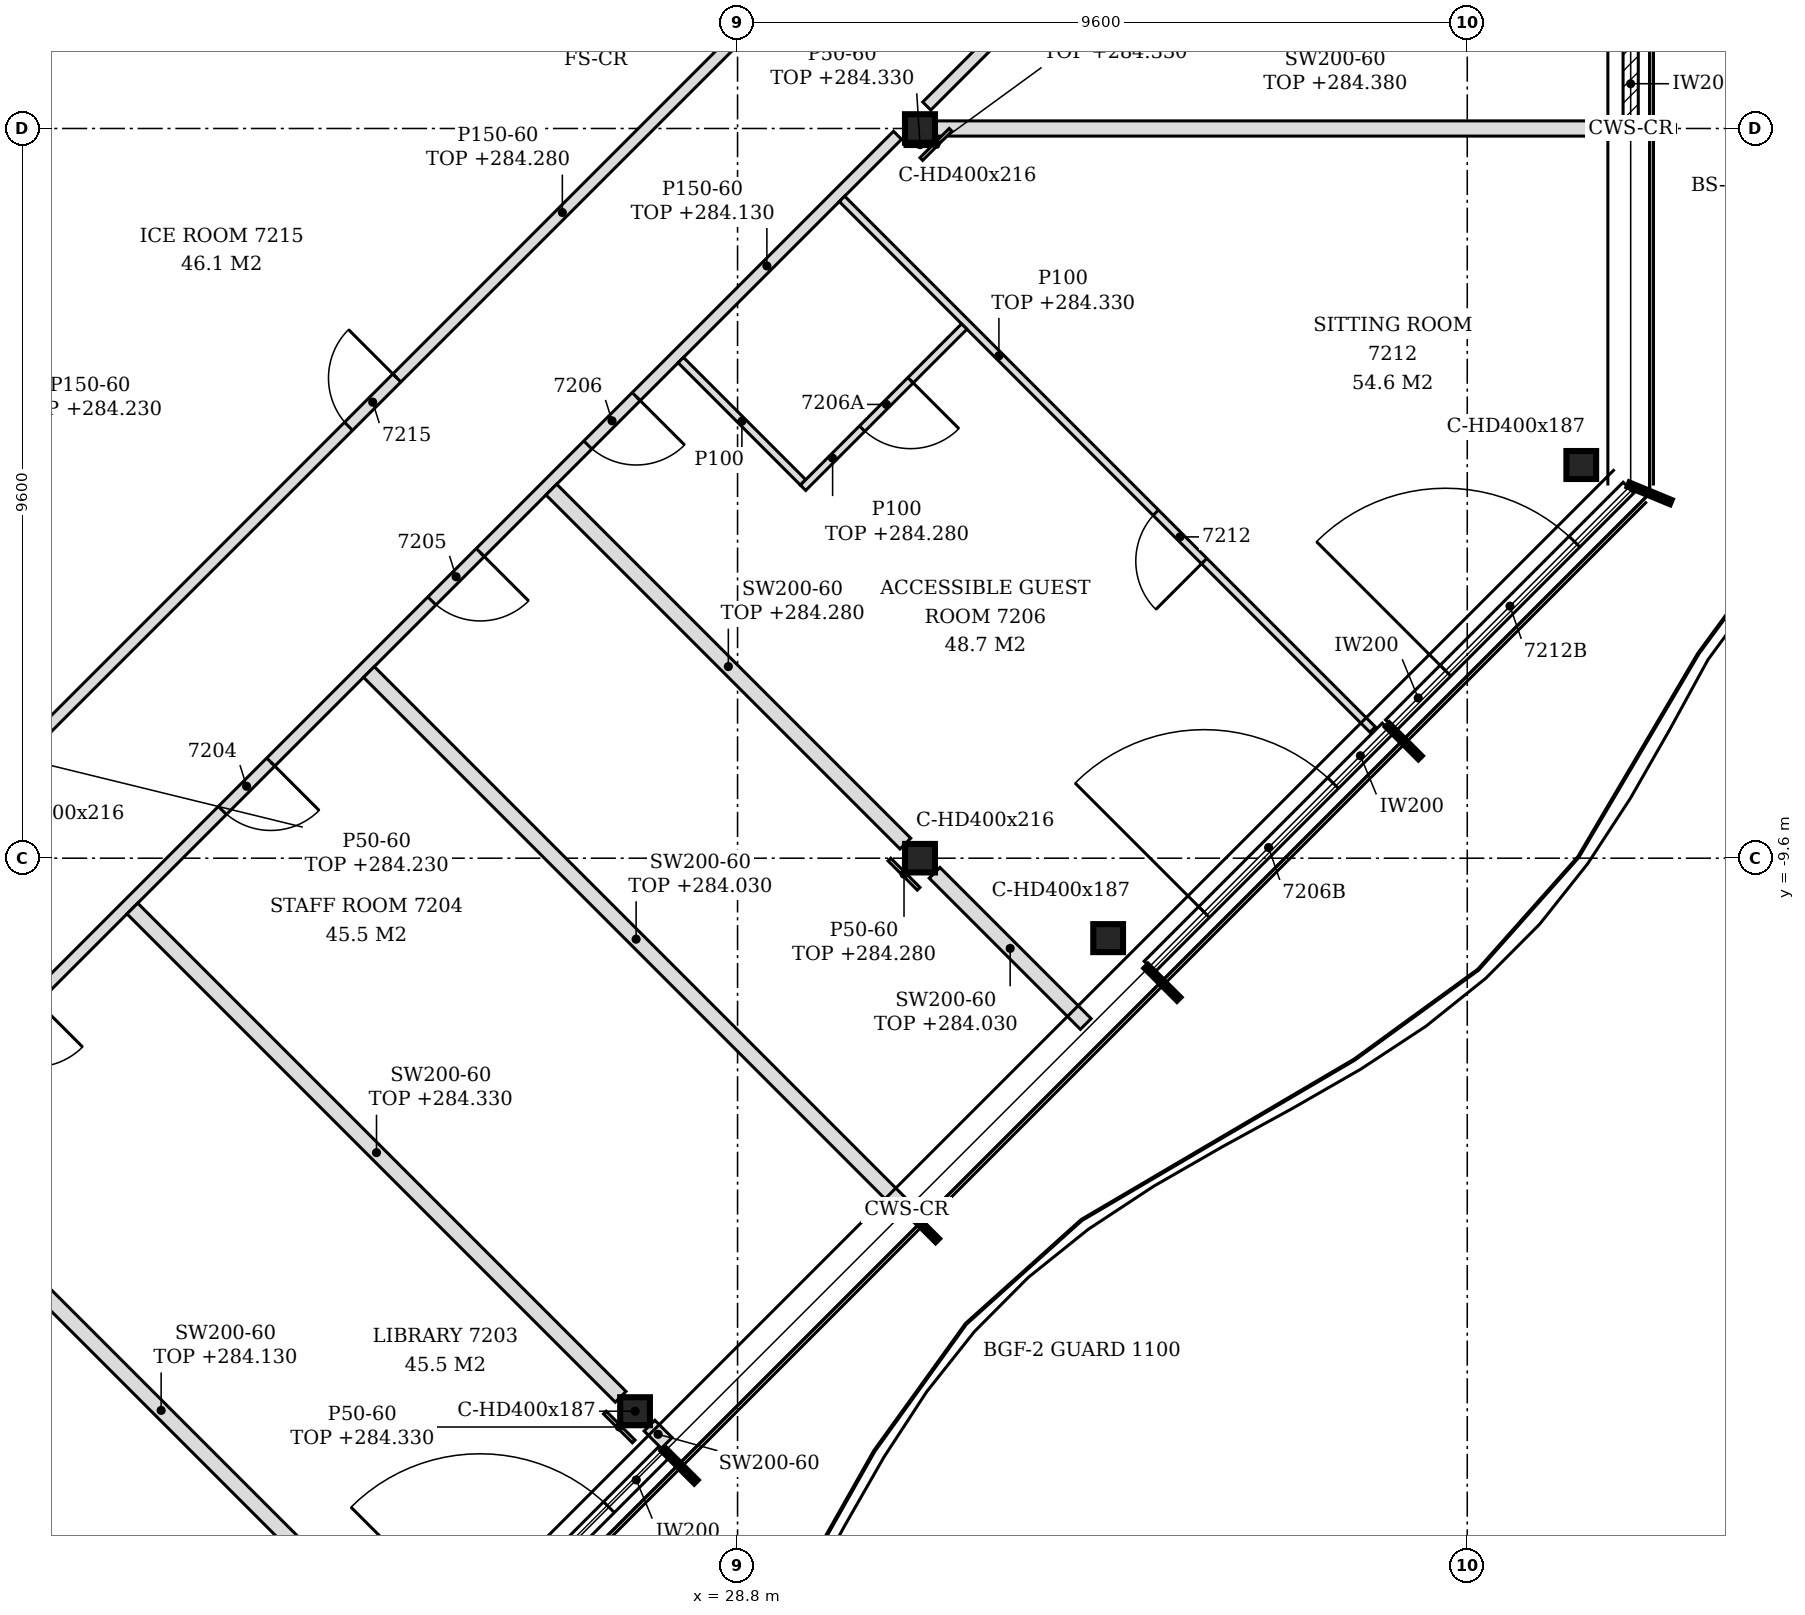
"""IFC4 building model, lengths in metres.
Left out: names, types, materials, properties, quantities, classifications, styles, units other than length and angle.
Written with IfcOpenShell. Run it as: python <this file> out.ifc"""

import sys

from ifc_helpers import new_model, si_unit, direction, frame, frame_2d, origin, origin_2d, place, context, subcontext, project, spatial, polyline, rectangle, i_section, outline, extrude, element, fill, save


model = new_model("IFC4")
c1 = context("Model", 3, precision=1e-05, world=origin(), true_north=direction((0.0, 1.0)))
c2 = subcontext(c1, "Body", "Model", "MODEL_VIEW")
j1 = project(units=[si_unit("LENGTHUNIT", "METRE"), si_unit("PLANEANGLEUNIT", "RADIAN")], contexts=[c1])
p1 = place(None, origin())
s1 = spatial("IfcSite", under=j1, at=p1, CompositionType="ELEMENT")
p2 = place(p1, origin())
s2 = spatial("IfcBuilding", under=s1, at=p2, CompositionType="ELEMENT")
p3 = place(p2, frame((0.0, 0.0, 281.4)))
s3 = spatial("IfcBuildingStorey", under=s2, at=p3, CompositionType="ELEMENT", Elevation=281.4)
for number, where, z_axis, x_axis in (
    (1, (27.451, -16.876, -0.15), (0.0, 0.0, 1.0), (1.0, 0.0, 0.0)),
    (2, (33.676, -10.652, -0.15), (0.0, 0.0, 1.0), (1.0, 0.0, 0.0)),
    (3, (39.9, -4.427, -0.15), (0.0, 0.0, 1.0), (1.0, 0.0, 0.0)),
):
    element("IfcColumn", number, at=place(p3, frame(where, z_axis=z_axis, x_axis=x_axis)), inside=s3, PredefinedType="COLUMN", context=c2, shape_type="SweptSolid", body=[
        extrude(i_section(OverallWidth=0.391, OverallDepth=0.368, WebThickness=0.015, FlangeThickness=0.024, FilletRadius=0.015, at=origin_2d()), origin(), (0.0, 0.0, 1.0), 3.6),
    ])
for number, where, z_axis, x_axis in (
    (4, (31.2, -9.6, -0.15), (0.0, 0.0, 1.0), (1.0, 0.0, 0.0)),
    (5, (31.2, 0.0, -0.15), (0.0, 0.0, 1.0), (1.0, 0.0, 0.0)),
):
    element("IfcColumn", number, at=place(p3, frame(where, z_axis=z_axis, x_axis=x_axis)), inside=s3, PredefinedType="COLUMN", context=c2, shape_type="SweptSolid", body=[
        extrude(i_section(OverallWidth=0.394, OverallDepth=0.375, WebThickness=0.017, FlangeThickness=0.028, FilletRadius=0.015, at=origin_2d()), origin(), (0.0, 0.0, 1.0), 3.6),
    ])
p4 = place(p3, frame((24.693, -20.553, 0.0), z_axis=(0.0, 0.0, 1.0), x_axis=(0.707079231393, 0.707134329907, 0.0)))
e6 = element("IfcWall", 6, at=p4, inside=s3, PredefinedType="NOTDEFINED", context=c2, shape_type="SweptSolid", body=[
    extrude(rectangle(XDim=4.431, YDim=0.2, at=frame_2d((2.215, 0.0))), origin(), (0.0, 0.0, 1.0), 3.45),
])
p5 = place(p4, frame((1.015, 0.0, 0.0)))
e7 = element("IfcOpeningElement", 7, at=p5, cuts=e6, PredefinedType="OPENING", context=c2, shape_type="SweptSolid", body=[
    extrude(rectangle(XDim=2.4, YDim=2.4, at=frame_2d((1.2, 1.2))), frame((0.0, 0.11, 0.0), z_axis=(0.0, -1.0, 0.0), x_axis=(1.0, 0.0, 0.0)), (0.0, 0.0, 1.0), 0.22),
])
p6 = place(p3, frame((34.22, -11.026, 0.0), z_axis=(0.0, 0.0, 1.0), x_axis=(0.707134329907, 0.707079231393, 0.0)))
e8 = element("IfcWall", 8, at=p6, inside=s3, PredefinedType="NOTDEFINED", context=c2, shape_type="SweptSolid", body=[
    extrude(rectangle(XDim=4.431, YDim=0.2, at=frame_2d((2.215, 0.0))), origin(), (0.0, 0.0, 1.0), 3.45),
])
p7 = place(p6, frame((1.015, 0.0, 0.0)))
e9 = element("IfcOpeningElement", 9, at=p7, cuts=e8, PredefinedType="OPENING", context=c2, shape_type="SweptSolid", body=[
    extrude(rectangle(XDim=2.4, YDim=2.4, at=frame_2d((1.2, 1.2))), frame((0.0, 0.11, 0.0), z_axis=(0.0, -1.0, 0.0), x_axis=(1.0, 0.0, 0.0)), (0.0, 0.0, 1.0), 0.22),
])
p8 = place(p3, frame((37.396, -7.851, 0.0), z_axis=(0.0, 0.0, 1.0), x_axis=(0.707106781187, 0.707106781187, 0.0)))
e10 = element("IfcWall", 10, at=p8, inside=s3, PredefinedType="NOTDEFINED", context=c2, shape_type="SweptSolid", body=[
    extrude(rectangle(XDim=4.421, YDim=0.2, at=frame_2d((2.21, 0.0))), origin(), (0.0, 0.0, 1.0), 3.45),
])
p9 = place(p8, frame((1.016, 0.0, 0.0)))
e11 = element("IfcOpeningElement", 11, at=p9, cuts=e10, PredefinedType="OPENING", context=c2, shape_type="SweptSolid", body=[
    extrude(rectangle(XDim=2.4, YDim=2.4, at=frame_2d((1.2, 1.2))), frame((0.0, 0.11, 0.0), z_axis=(0.0, -1.0, 0.0), x_axis=(1.0, 0.0, 0.0)), (0.0, 0.0, 1.0), 0.22),
])
p10 = place(p3, frame((40.55, 0.03, 0.0), z_axis=(0.0, 0.0, 1.0), x_axis=(0.0, 1.0, 0.0)))
e12 = element("IfcWall", 12, at=p10, inside=s3, PredefinedType="NOTDEFINED", context=c2, shape_type="SweptSolid", body=[
    extrude(rectangle(XDim=4.626, YDim=0.2, at=frame_2d((2.313, 0.0))), origin(), (0.0, 0.0, 1.0), 3.45),
])
p11 = place(p10, frame((1.118, 0.0, 0.0)))
e13 = element("IfcOpeningElement", 13, at=p11, cuts=e12, PredefinedType="OPENING", context=c2, shape_type="SweptSolid", body=[
    extrude(rectangle(XDim=2.4, YDim=2.4, at=frame_2d((1.2, 1.2))), frame((0.0, 0.11, 0.0), z_axis=(0.0, -1.0, 0.0), x_axis=(1.0, 0.0, 0.0)), (0.0, 0.0, 1.0), 0.22),
])
p12 = place(p3, frame((24.707, -20.355, 0.0), z_axis=(0.0, 0.0, 1.0), x_axis=(-0.707106781187, 0.707106781187, 0.0)))
e14 = element("IfcWall", 14, at=p12, inside=s3, PredefinedType="PARTITIONING", context=c2, shape_type="SweptSolid", body=[
    extrude(rectangle(XDim=9.873, YDim=0.2, at=frame_2d((4.937, 0.0))), origin(), (0.0, 0.0, 1.0), 2.73),
])
p13 = place(p3, frame((27.869, -17.293, 0.0), z_axis=(0.0, 0.0, 1.0), x_axis=(-0.707106781187, 0.707106781187, 0.0)))
e15 = element("IfcWall", 15, at=p13, inside=s3, PredefinedType="PARTITIONING", context=c2, shape_type="SweptSolid", body=[
    extrude(rectangle(XDim=0.322, YDim=0.2, at=frame_2d((0.161, 0.0))), origin(), (0.0, 0.0, 1.0), 3.45),
])
p14 = place(p3, frame((14.322, -16.672, 0.0), z_axis=(0.0, 0.0, 1.0), x_axis=(0.707106781187, 0.707106781187, 0.0)))
e16 = element("IfcWall", 16, at=p14, inside=s3, PredefinedType="PARTITIONING", context=c2, shape_type="SweptSolid", body=[
    extrude(rectangle(XDim=23.452, YDim=0.15, at=frame_2d((11.726, 0.0))), origin(), (0.0, 0.0, 1.0), 2.73),
])
p15 = place(p14, frame((0.775, 0.0, 0.0)))
e17 = element("IfcOpeningElement", 17, at=p15, cuts=e16, PredefinedType="OPENING", context=c2, shape_type="SweptSolid", body=[
    extrude(rectangle(XDim=0.9, YDim=2.1, at=frame_2d((0.45, 1.05))), frame((0.0, 0.085, 0.0), z_axis=(0.0, -1.0, 0.0), x_axis=(1.0, 0.0, 0.0)), (0.0, 0.0, 1.0), 0.17),
])
p16 = place(p14, frame((6.489, 0.0, 0.0)))
e18 = element("IfcOpeningElement", 18, at=p16, cuts=e16, PredefinedType="OPENING", context=c2, shape_type="SweptSolid", body=[
    extrude(rectangle(XDim=0.9, YDim=2.1, at=frame_2d((0.45, 1.05))), frame((0.0, 0.085, 0.0), z_axis=(0.0, -1.0, 0.0), x_axis=(1.0, 0.0, 0.0)), (0.0, 0.0, 1.0), 0.17),
])
p17 = place(p14, frame((10.89, 0.0, 0.0)))
e19 = element("IfcOpeningElement", 19, at=p17, cuts=e16, PredefinedType="OPENING", context=c2, shape_type="SweptSolid", body=[
    extrude(rectangle(XDim=0.9, YDim=2.1, at=frame_2d((0.45, 1.05))), frame((0.0, 0.085, 0.0), z_axis=(0.0, -1.0, 0.0), x_axis=(1.0, 0.0, 0.0)), (0.0, 0.0, 1.0), 0.17),
])
p18 = place(p14, frame((14.788, 0.0, 0.0)))
e20 = element("IfcOpeningElement", 20, at=p18, cuts=e16, PredefinedType="OPENING", context=c2, shape_type="SweptSolid", body=[
    extrude(rectangle(XDim=0.9, YDim=2.1, at=frame_2d((0.45, 1.05))), frame((0.0, 0.085, 0.0), z_axis=(0.0, -1.0, 0.0), x_axis=(1.0, 0.0, 0.0)), (0.0, 0.0, 1.0), 0.17),
])
p19 = place(p14, frame((17.689, 0.0, 0.0)))
e21 = element("IfcOpeningElement", 21, at=p19, cuts=e16, PredefinedType="OPENING", context=c2, shape_type="SweptSolid", body=[
    extrude(rectangle(XDim=0.9, YDim=2.1, at=frame_2d((0.45, 1.05))), frame((0.0, 0.085, 0.0), z_axis=(0.0, -1.0, 0.0), x_axis=(1.0, 0.0, 0.0)), (0.0, 0.0, 1.0), 0.17),
])
p20 = place(p3, frame((27.262, -16.686, 0.0), z_axis=(0.0, 0.0, 1.0), x_axis=(-0.707106781187, 0.707106781187, 0.0)))
e22 = element("IfcWall", 22, at=p20, inside=s3, PredefinedType="PARTITIONING", context=c2, shape_type="SweptSolid", body=[
    extrude(rectangle(XDim=9.085, YDim=0.2, at=frame_2d((4.542, 0.0))), origin(), (0.0, 0.0, 1.0), 2.93),
])
p21 = place(p3, frame((30.981, -14.181, 0.0), z_axis=(0.0, 0.0, 1.0), x_axis=(-0.707094504281, 0.707119057879, 0.0)))
e23 = element("IfcWall", 23, at=p21, inside=s3, PredefinedType="PARTITIONING", context=c2, shape_type="SweptSolid", body=[
    extrude(rectangle(XDim=9.943, YDim=0.2, at=frame_2d((4.972, 0.0))), origin(), (0.0, 0.0, 1.0), 2.63),
])
p22 = place(p3, frame((33.381, -11.781, 0.0), z_axis=(0.0, 0.0, 1.0), x_axis=(-0.707106781187, 0.707106781187, 0.0)))
e24 = element("IfcWall", 24, at=p22, inside=s3, PredefinedType="PARTITIONING", context=c2, shape_type="SweptSolid", body=[
    extrude(rectangle(XDim=2.812, YDim=0.2, at=frame_2d((1.406, 0.0))), origin(), (0.0, 0.0, 1.0), 2.63),
])
p23 = place(p3, frame((31.008, -9.408, 0.0), z_axis=(0.0, 0.0, 1.0), x_axis=(-0.707106781187, 0.707106781187, 0.0)))
e25 = element("IfcWall", 25, at=p23, inside=s3, PredefinedType="PARTITIONING", context=c2, shape_type="SweptSolid", body=[
    extrude(rectangle(XDim=6.587, YDim=0.2, at=frame_2d((3.293, 0.0))), origin(), (0.0, 0.0, 1.0), 2.88),
])
p24 = place(p3, frame((19.392, -8.208, 0.0), z_axis=(0.0, 0.0, 1.0), x_axis=(0.707106781187, 0.707106781187, 0.0)))
e26 = element("IfcWall", 26, at=p24, inside=s3, PredefinedType="PARTITIONING", context=c2, shape_type="SweptSolid", body=[
    extrude(rectangle(XDim=13.124, YDim=0.15, at=frame_2d((6.562, 0.0))), origin(), (0.0, 0.0, 1.0), 2.88),
])
p25 = place(p24, frame((6.066, 0.0, 0.0)))
e27 = element("IfcOpeningElement", 27, at=p25, cuts=e26, PredefinedType="OPENING", context=c2, shape_type="SweptSolid", body=[
    extrude(rectangle(XDim=0.9, YDim=2.1, at=frame_2d((0.45, 1.05))), frame((0.0, 0.085, 0.0), z_axis=(0.0, -1.0, 0.0), x_axis=(1.0, 0.0, 0.0)), (0.0, 0.0, 1.0), 0.17),
])
p26 = place(p3, frame((37.155, -7.907, 0.0), z_axis=(0.0, 0.0, 1.0), x_axis=(-0.707106781187, 0.707106781187, 0.0)))
e28 = element("IfcWall", 28, at=p26, inside=s3, PredefinedType="PARTITIONING", context=c2, shape_type="SweptSolid", body=[
    extrude(rectangle(XDim=9.873, YDim=0.1, at=frame_2d((4.937, 0.0))), origin(), (0.0, 0.0, 1.0), 2.93),
])
p27 = place(p26, frame((3.134, 0.0, 0.0)))
e29 = element("IfcOpeningElement", 29, at=p27, cuts=e28, PredefinedType="OPENING", context=c2, shape_type="SweptSolid", body=[
    extrude(rectangle(XDim=0.9, YDim=2.1, at=frame_2d((0.45, 1.05))), frame((0.0, 0.06, 0.0), z_axis=(0.0, -1.0, 0.0), x_axis=(1.0, 0.0, 0.0)), (0.0, 0.0, 1.0), 0.12),
])
p28 = place(p3, frame((29.662, -4.656, 0.0), z_axis=(0.0, 0.0, 1.0), x_axis=(-0.707160441348, 0.707053116953, 0.0)))
e30 = element("IfcWall", 30, at=p28, inside=s3, PredefinedType="PARTITIONING", context=c2, shape_type="SweptSolid", body=[
    extrude(rectangle(XDim=2.275, YDim=0.1, at=frame_2d((1.137, 0.0))), origin(), (0.0, 0.0, 1.0), 3.45),
])
p29 = place(p3, frame((29.662, -4.726, 0.0), z_axis=(0.0, 0.0, 1.0), x_axis=(0.707147476809, 0.707066083222, 0.0)))
e31 = element("IfcWall", 31, at=p29, inside=s3, PredefinedType="PARTITIONING", context=c2, shape_type="SweptSolid", body=[
    extrude(rectangle(XDim=3.0, YDim=0.1, at=frame_2d((1.5, 0.0))), origin(), (0.0, 0.0, 1.0), 2.88),
])
p30 = place(p29, frame((1.1, 0.0, 0.0)))
e32 = element("IfcOpeningElement", 32, at=p30, cuts=e31, PredefinedType="OPENING", context=c2, shape_type="SweptSolid", body=[
    extrude(rectangle(XDim=0.9, YDim=2.1, at=frame_2d((0.45, 1.05))), frame((0.0, 0.06, 0.0), z_axis=(0.0, -1.0, 0.0), x_axis=(1.0, 0.0, 0.0)), (0.0, 0.0, 1.0), 0.12),
])
p31 = place(p3, frame((31.397, 0.0, 0.0), z_axis=(0.0, 0.0, 1.0), x_axis=(1.0, 0.0, 0.0)))
e33 = element("IfcWall", 33, at=p31, inside=s3, PredefinedType="PARTITIONING", context=c2, shape_type="SweptSolid", body=[
    extrude(outline(polyline([(0.0, 0.0), (9.053, 0.0), (9.053, 2.98), (8.653, 2.98), (8.651, 2.93), (8.353, 2.93), (8.351, 2.98), (0.0, 2.98), (0.0, 0.0)])), frame((0.0, 0.1, 0.0), z_axis=(0.0, -1.0, 0.0), x_axis=(1.0, 0.0, 0.0)), (0.0, 0.0, 1.0), 0.2),
])
p32 = place(p3, frame((31.289, 0.295, 0.0), z_axis=(0.0, 0.0, 1.0), x_axis=(0.707147793093, 0.707065766902, 0.0)))
e34 = element("IfcWall", 34, at=p32, inside=s3, PredefinedType="PARTITIONING", context=c2, shape_type="SweptSolid", body=[
    extrude(rectangle(XDim=2.976, YDim=0.15, at=frame_2d((1.488, 0.0))), origin(), (0.0, 0.0, 1.0), 2.93),
])
p33 = place(p3, frame((27.434, -17.273, 0.0), z_axis=(0.0, 0.0, 1.0), x_axis=(-0.707106781187, 0.707106781187, 0.0)))
e35 = element("IfcWall", 35, at=p33, inside=s3, PredefinedType="PARTITIONING", context=c2, shape_type="SweptSolid", body=[
    extrude(rectangle(XDim=0.537, YDim=0.05, at=frame_2d((0.269, 0.0))), origin(), (0.0, 0.0, 1.0), 2.93),
])
p34 = place(p3, frame((31.218, -0.402, 0.0), z_axis=(0.0, 0.0, 1.0), x_axis=(0.707106781187, 0.707106781187, 0.0)))
e36 = element("IfcWall", 36, at=p34, inside=s3, PredefinedType="PARTITIONING", context=c2, shape_type="SweptSolid", body=[
    extrude(rectangle(XDim=0.544, YDim=0.05, at=frame_2d((0.272, 0.0))), origin(), (0.0, 0.0, 1.0), 2.93),
])
p35 = place(p3, frame((31.182, -10.002, 0.0), z_axis=(0.0, 0.0, 1.0), x_axis=(-0.707106781187, 0.707106781187, 0.0)))
e37 = element("IfcWall", 37, at=p35, inside=s3, PredefinedType="PARTITIONING", context=c2, shape_type="SweptSolid", body=[
    extrude(rectangle(XDim=0.544, YDim=0.05, at=frame_2d((0.272, 0.0))), origin(), (0.0, 0.0, 1.0), 2.88),
])
p36 = place(p3, frame((31.003, -0.212, 0.0), z_axis=(0.0, 0.0, 1.0), x_axis=(1.0, 0.0, 0.0)))
e38 = element("IfcWall", 38, at=p36, inside=s3, PredefinedType="PARTITIONING", context=c2, shape_type="SweptSolid", body=[
    extrude(rectangle(XDim=0.394, YDim=0.05, at=frame_2d((0.197, 0.0))), origin(), (0.0, 0.0, 1.0), 2.93),
])
p37 = place(p5, origin())
e39 = element("IfcDoor", 39, at=p37, inside=s3, OperationType="SINGLE_SWING_LEFT", PredefinedType="DOOR", context=c2, shape_type="SweptSolid", body=[
    extrude(rectangle(XDim=2.4, YDim=2.4, at=frame_2d((1.2, 1.2))), frame((0.0, 0.025, 0.0), z_axis=(0.0, -1.0, 0.0), x_axis=(1.0, 0.0, 0.0)), (0.0, 0.0, 1.0), 0.05),
])
fill(e7, e39)
p38 = place(p7, origin())
e40 = element("IfcDoor", 40, at=p38, inside=s3, OperationType="SINGLE_SWING_LEFT", PredefinedType="DOOR", context=c2, shape_type="SweptSolid", body=[
    extrude(rectangle(XDim=2.4, YDim=2.4, at=frame_2d((1.2, 1.2))), frame((0.0, 0.025, 0.0), z_axis=(0.0, -1.0, 0.0), x_axis=(1.0, 0.0, 0.0)), (0.0, 0.0, 1.0), 0.05),
])
fill(e9, e40)
p39 = place(p9, origin())
e41 = element("IfcDoor", 41, at=p39, inside=s3, OperationType="SINGLE_SWING_LEFT", PredefinedType="DOOR", context=c2, shape_type="SweptSolid", body=[
    extrude(rectangle(XDim=2.4, YDim=2.4, at=frame_2d((1.2, 1.2))), frame((0.0, 0.025, 0.0), z_axis=(0.0, -1.0, 0.0), x_axis=(1.0, 0.0, 0.0)), (0.0, 0.0, 1.0), 0.05),
])
fill(e11, e41)
p40 = place(p17, frame((0.9, 0.0, 0.0), z_axis=(0.0, 0.0, 1.0), x_axis=(-1.0, 0.0, 0.0)))
e42 = element("IfcDoor", 42, at=p40, inside=s3, OperationType="SINGLE_SWING_LEFT", PredefinedType="DOOR", context=c2, shape_type="SweptSolid", body=[
    extrude(rectangle(XDim=0.9, YDim=2.1, at=frame_2d((0.45, 1.05))), frame((0.0, 0.025, 0.0), z_axis=(0.0, -1.0, 0.0), x_axis=(1.0, 0.0, 0.0)), (0.0, 0.0, 1.0), 0.05),
])
fill(e19, e42)
p41 = place(p18, frame((0.9, 0.0, 0.0), z_axis=(0.0, 0.0, 1.0), x_axis=(-1.0, 0.0, 0.0)))
e43 = element("IfcDoor", 43, at=p41, inside=s3, OperationType="SINGLE_SWING_LEFT", PredefinedType="DOOR", context=c2, shape_type="SweptSolid", body=[
    extrude(rectangle(XDim=0.9, YDim=2.1, at=frame_2d((0.45, 1.05))), frame((0.0, 0.025, 0.0), z_axis=(0.0, -1.0, 0.0), x_axis=(1.0, 0.0, 0.0)), (0.0, 0.0, 1.0), 0.05),
])
fill(e20, e43)
p42 = place(p19, frame((0.9, 0.0, 0.0), z_axis=(0.0, 0.0, 1.0), x_axis=(-1.0, 0.0, 0.0)))
e44 = element("IfcDoor", 44, at=p42, inside=s3, OperationType="SINGLE_SWING_LEFT", PredefinedType="DOOR", context=c2, shape_type="SweptSolid", body=[
    extrude(rectangle(XDim=0.9, YDim=2.1, at=frame_2d((0.45, 1.05))), frame((0.0, 0.025, 0.0), z_axis=(0.0, -1.0, 0.0), x_axis=(1.0, 0.0, 0.0)), (0.0, 0.0, 1.0), 0.05),
])
fill(e21, e44)
p43 = place(p30, frame((0.9, 0.0, 0.0), z_axis=(0.0, 0.0, 1.0), x_axis=(-1.0, 0.0, 0.0)))
e45 = element("IfcDoor", 45, at=p43, inside=s3, OperationType="SINGLE_SWING_LEFT", PredefinedType="DOOR", context=c2, shape_type="SweptSolid", body=[
    extrude(rectangle(XDim=0.9, YDim=2.1, at=frame_2d((0.45, 1.05))), frame((0.0, 0.025, 0.0), z_axis=(0.0, -1.0, 0.0), x_axis=(1.0, 0.0, 0.0)), (0.0, 0.0, 1.0), 0.05),
])
fill(e32, e45)
p44 = place(p27, origin())
e46 = element("IfcDoor", 46, at=p44, inside=s3, OperationType="SINGLE_SWING_LEFT", PredefinedType="DOOR", context=c2, shape_type="SweptSolid", body=[
    extrude(rectangle(XDim=0.9, YDim=2.1, at=frame_2d((0.45, 1.05))), frame((0.0, 0.025, 0.0), z_axis=(0.0, -1.0, 0.0), x_axis=(1.0, 0.0, 0.0)), (0.0, 0.0, 1.0), 0.05),
])
fill(e29, e46)
p45 = place(p25, origin())
e47 = element("IfcDoor", 47, at=p45, inside=s3, OperationType="SINGLE_SWING_RIGHT", PredefinedType="DOOR", context=c2, shape_type="SweptSolid", body=[
    extrude(rectangle(XDim=0.9, YDim=2.1, at=frame_2d((0.45, 1.05))), frame((0.0, 0.025, 0.0), z_axis=(0.0, -1.0, 0.0), x_axis=(1.0, 0.0, 0.0)), (0.0, 0.0, 1.0), 0.05),
])
fill(e27, e47)
save(model, sys.argv[1])
